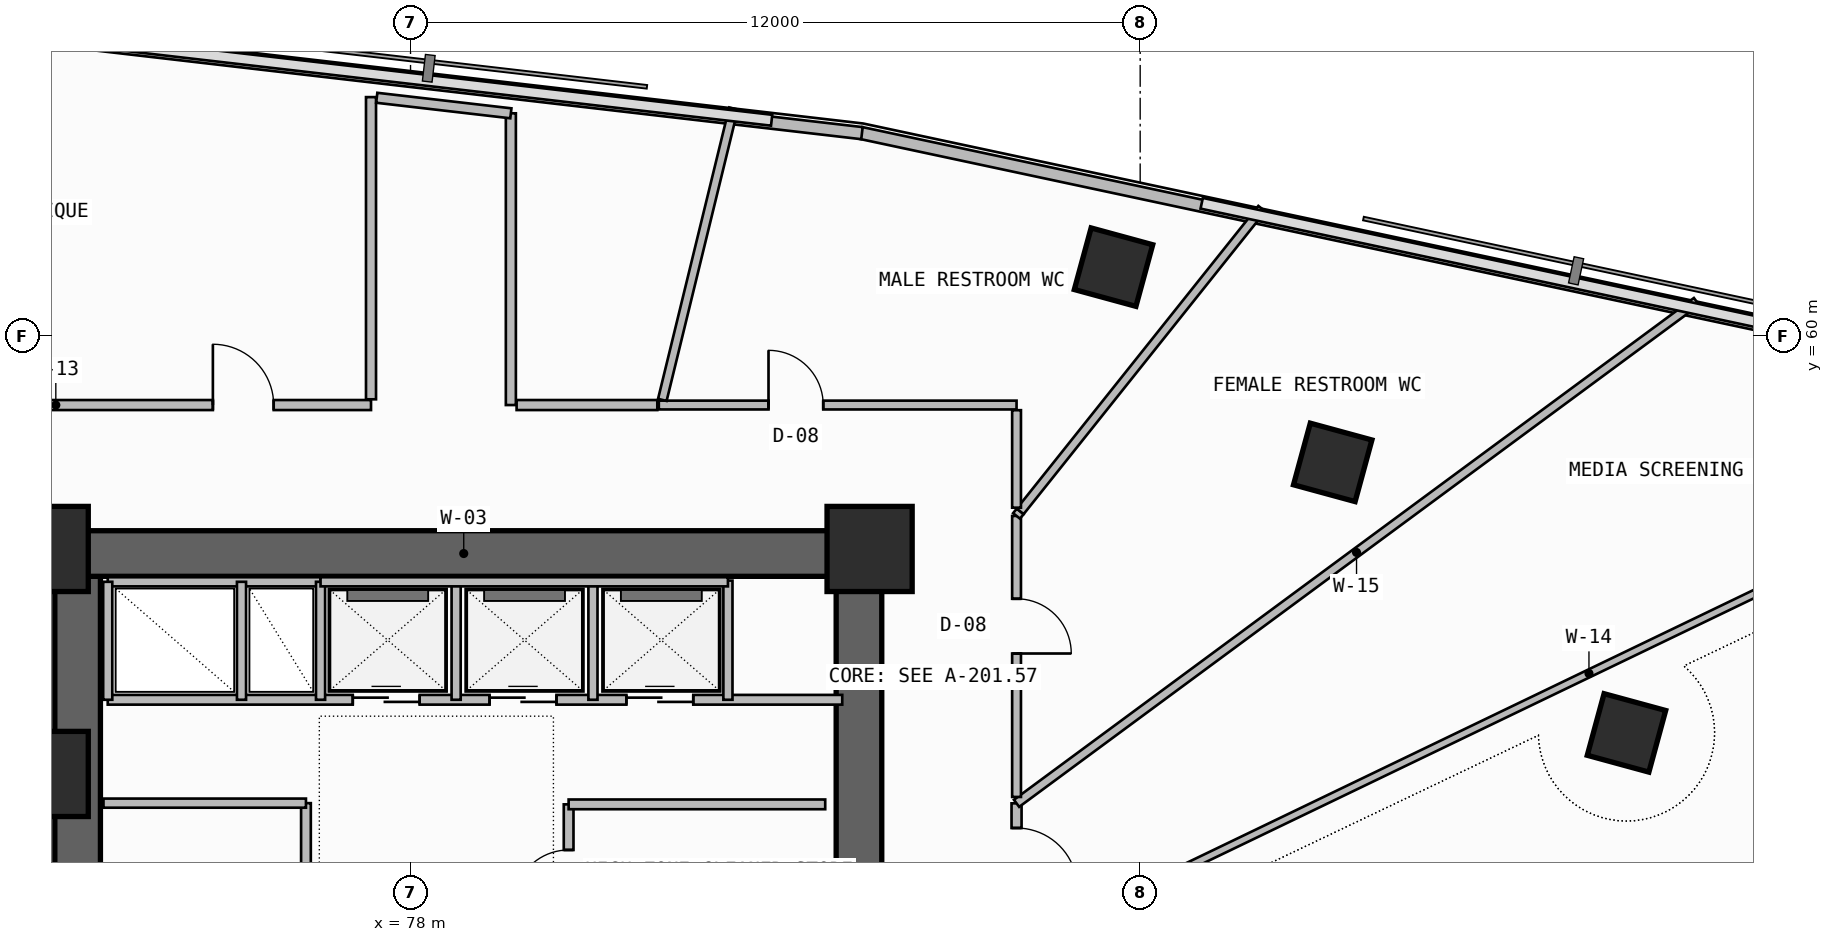
"""IFC4 building model, lengths in metres.
Left out: names, types, materials, properties, quantities, classifications, styles, units other than length and angle.
Written with IfcOpenShell. Run it as: python <this file> out.ifc"""

import sys

from ifc_helpers import new_model, si_unit, direction, frame, frame_2d, origin, origin_2d, place, context, subcontext, project, spatial, rectangle, extrude, element, fill, save


model = new_model("IFC4")
c1 = context("Model", 3, precision=1e-05, world=origin(), true_north=direction((0.0, 1.0)))
c2 = subcontext(c1, "Body", "Model", "MODEL_VIEW")
j1 = project(units=[si_unit("LENGTHUNIT", "METRE"), si_unit("PLANEANGLEUNIT", "RADIAN")], contexts=[c1])
p1 = place(None, origin())
s1 = spatial("IfcSite", under=j1, at=p1, CompositionType="ELEMENT")
p2 = place(p1, origin())
s2 = spatial("IfcBuilding", under=s1, at=p2, CompositionType="ELEMENT")
p3 = place(p2, frame((0.0, 0.0, 204.42)))
s3 = spatial("IfcBuildingStorey", under=s2, at=p3, CompositionType="ELEMENT", Elevation=204.42)
p4 = place(p3, frame((72.525, 43.35, -0.26), z_axis=(0.0, 0.0, 1.0), x_axis=(0.0, 1.0, 0.0)))
e1 = element("IfcWall", 1, at=p4, inside=s3, PredefinedType="SHEAR", context=c2, shape_type="SweptSolid", body=[
    extrude(rectangle(XDim=12.7, YDim=0.75, at=frame_2d((6.35, 0.0))), origin(), (0.0, 0.0, 1.0), 3.52),
])
p5 = place(p4, frame((1.35, 0.0, 0.26)))
e2 = element("IfcOpeningElement", 2, at=p5, cuts=e1, PredefinedType="OPENING", context=c2, shape_type="SweptSolid", body=[
    extrude(rectangle(XDim=1.2, YDim=2.2, at=frame_2d((0.6, 1.1))), frame((0.0, 0.385, 0.0), z_axis=(0.0, -1.0, 0.0), x_axis=(1.0, 0.0, 0.0)), (0.0, 0.0, 1.0), 0.77),
])
p6 = place(p3, frame((72.0, 56.425, -0.26), z_axis=(0.0, 0.0, 1.0), x_axis=(1.0, 0.0, 0.0)))
e3 = element("IfcWall", 3, at=p6, inside=s3, PredefinedType="SHEAR", context=c2, shape_type="SweptSolid", body=[
    extrude(rectangle(XDim=13.75, YDim=0.75, at=frame_2d((6.875, 0.0))), origin(), (0.0, 0.0, 1.0), 3.52),
])
p7 = place(p3, frame((85.375, 47.6, -0.26), z_axis=(0.0, 0.0, 1.0), x_axis=(0.0, 1.0, 0.0)))
e4 = element("IfcWall", 4, at=p7, inside=s3, PredefinedType="SHEAR", context=c2, shape_type="SweptSolid", body=[
    extrude(rectangle(XDim=8.45, YDim=0.75, at=frame_2d((4.225, 0.0))), origin(), (0.0, 0.0, 1.0), 3.52),
])
for number, where, z_axis, x_axis in (
    (5, (72.0, 52.8, 0.0), (0.0, 0.0, 1.0), (1.0, 0.0, 0.0)),
    (6, (72.0, 56.5, 0.0), (0.0, 0.0, 1.0), (1.0, 0.0, 0.0)),
    (7, (85.55, 56.5, 0.0), (0.0, 0.0, 1.0), (1.0, 0.0, 0.0)),
):
    element("IfcColumn", number, at=place(p3, frame(where, z_axis=z_axis, x_axis=x_axis)), inside=s3, PredefinedType="COLUMN", context=c2, shape_type="SweptSolid", body=[
        extrude(rectangle(XDim=1.4, YDim=1.4, at=origin_2d()), origin(), (0.0, 0.0, 1.0), 3.52),
    ])
for number, where, z_axis, x_axis in (
    (8, (97.998, 53.475, 0.0), (0.0, 0.0, 1.0), (0.263, 0.965, 0.0)),
    (9, (93.167, 57.924, 0.0), (0.0, 0.0, 1.0), (0.263, 0.965, 0.0)),
    (10, (89.562, 61.135, 0.0), (0.0, 0.0, 1.0), (0.263, 0.965, 0.0)),
):
    element("IfcColumn", number, at=place(p3, frame(where, z_axis=z_axis, x_axis=x_axis)), inside=s3, PredefinedType="COLUMN", context=c2, shape_type="SweptSolid", body=[
        extrude(rectangle(XDim=1.05, YDim=1.05, at=origin_2d()), origin(), (0.0, 0.0, 1.0), 3.52),
    ])
p8 = place(p3, frame((116.396, 56.722, 0.0), z_axis=(0.0, 0.0, 1.0), x_axis=(-0.977936620644, 0.208901809478, 0.0)))
e11 = element("IfcWall", 11, at=p8, inside=s3, PredefinedType="PARAPET", context=c2, shape_type="SweptSolid", body=[
    extrude(rectangle(XDim=31.685, YDim=0.2, at=frame_2d((15.843, 0.0))), origin(), (0.0, 0.0, 1.0), 1.15),
])
p9 = place(p3, frame((85.424, 63.338, 0.0), z_axis=(0.0, 0.0, 1.0), x_axis=(-0.993364714048, 0.115006716693, 0.0)))
e12 = element("IfcWall", 12, at=p9, inside=s3, PredefinedType="PARAPET", context=c2, shape_type="SweptSolid", body=[
    extrude(rectangle(XDim=26.302, YDim=0.2, at=frame_2d((13.151, 0.0))), origin(), (0.0, 0.0, 1.0), 1.15),
])
p10 = place(p3, frame((76.28, 47.18, 0.0), z_axis=(0.0, 0.0, 1.0), x_axis=(0.0, 1.0, 0.0)))
e13 = element("IfcWall", 13, at=p10, inside=s3, PredefinedType="SOLIDWALL", context=c2, shape_type="SweptSolid", body=[
    extrude(rectangle(XDim=5.14, YDim=0.16, at=frame_2d((2.57, 0.0))), origin(), (0.0, 0.0, 1.0), 3.26),
])
p11 = place(p10, frame((0.75, 0.0, 0.0)))
e14 = element("IfcOpeningElement", 14, at=p11, cuts=e13, PredefinedType="OPENING", context=c2, shape_type="SweptSolid", body=[
    extrude(rectangle(XDim=1.0, YDim=2.2, at=frame_2d((0.5, 1.1))), frame((0.0, 0.09, 0.0), z_axis=(0.0, -1.0, 0.0), x_axis=(1.0, 0.0, 0.0)), (0.0, 0.0, 1.0), 0.18),
])
p12 = place(p10, frame((3.2, 0.0, 0.0)))
e15 = element("IfcOpeningElement", 15, at=p12, cuts=e13, PredefinedType="OPENING", context=c2, shape_type="SweptSolid", body=[
    extrude(rectangle(XDim=0.9, YDim=2.1, at=frame_2d((0.45, 1.05))), frame((0.0, 0.09, 0.0), z_axis=(0.0, -1.0, 0.0), x_axis=(1.0, 0.0, 0.0)), (0.0, 0.0, 1.0), 0.18),
])
p13 = place(p3, frame((72.95, 52.32, 0.0), z_axis=(0.0, 0.0, 1.0), x_axis=(1.0, 0.0, 0.0)))
e16 = element("IfcWall", 16, at=p13, inside=s3, PredefinedType="SOLIDWALL", context=c2, shape_type="SweptSolid", body=[
    extrude(rectangle(XDim=3.33, YDim=0.15, at=frame_2d((1.665, 0.0))), origin(), (0.0, 0.0, 1.0), 3.26),
])
p14 = place(p3, frame((80.6, 47.7, 0.0), z_axis=(0.0, 0.0, 1.0), x_axis=(0.0, 1.0, 0.0)))
e17 = element("IfcWall", 17, at=p14, inside=s3, PredefinedType="SOLIDWALL", context=c2, shape_type="SweptSolid", body=[
    extrude(rectangle(XDim=4.6, YDim=0.16, at=frame_2d((2.3, 0.0))), origin(), (0.0, 0.0, 1.0), 3.26),
])
p15 = place(p14, frame((0.75, 0.0, 0.0)))
e18 = element("IfcOpeningElement", 18, at=p15, cuts=e17, PredefinedType="OPENING", context=c2, shape_type="SweptSolid", body=[
    extrude(rectangle(XDim=1.0, YDim=2.2, at=frame_2d((0.5, 1.1))), frame((0.0, 0.09, 0.0), z_axis=(0.0, -1.0, 0.0), x_axis=(1.0, 0.0, 0.0)), (0.0, 0.0, 1.0), 0.18),
])
p16 = place(p14, frame((2.95, 0.0, 0.0)))
e19 = element("IfcOpeningElement", 19, at=p16, cuts=e17, PredefinedType="OPENING", context=c2, shape_type="SweptSolid", body=[
    extrude(rectangle(XDim=0.9, YDim=2.1, at=frame_2d((0.45, 1.05))), frame((0.0, 0.09, 0.0), z_axis=(0.0, -1.0, 0.0), x_axis=(1.0, 0.0, 0.0)), (0.0, 0.0, 1.0), 0.18),
])
p17 = place(p3, frame((80.6, 52.3, 0.0), z_axis=(0.0, 0.0, 1.0), x_axis=(1.0, 0.0, 0.0)))
e20 = element("IfcWall", 20, at=p17, inside=s3, PredefinedType="SOLIDWALL", context=c2, shape_type="SweptSolid", body=[
    extrude(rectangle(XDim=4.22, YDim=0.16, at=frame_2d((2.11, 0.0))), origin(), (0.0, 0.0, 1.0), 3.26),
])
p18 = place(p3, frame((73.02, 54.02, 0.0), z_axis=(0.0, 0.0, 1.0), x_axis=(1.0, 0.0, 0.0)))
e21 = element("IfcWall", 21, at=p18, inside=s3, PredefinedType="SOLIDWALL", context=c2, shape_type="SweptSolid", body=[
    extrude(rectangle(XDim=12.08, YDim=0.16, at=frame_2d((6.04, 0.0))), origin(), (0.0, 0.0, 1.0), 3.26),
])
p19 = place(p18, frame((4.03, 0.0, 0.0)))
e22 = element("IfcOpeningElement", 22, at=p19, cuts=e21, PredefinedType="OPENING", context=c2, shape_type="SweptSolid", body=[
    extrude(rectangle(XDim=1.1, YDim=2.25, at=frame_2d((0.55, 1.125))), frame((0.0, 0.09, 0.0), z_axis=(0.0, -1.0, 0.0), x_axis=(1.0, 0.0, 0.0)), (0.0, 0.0, 1.0), 0.18),
])
p20 = place(p18, frame((6.28, 0.0, 0.0)))
e23 = element("IfcOpeningElement", 23, at=p20, cuts=e21, PredefinedType="OPENING", context=c2, shape_type="SweptSolid", body=[
    extrude(rectangle(XDim=1.1, YDim=2.25, at=frame_2d((0.55, 1.125))), frame((0.0, 0.09, 0.0), z_axis=(0.0, -1.0, 0.0), x_axis=(1.0, 0.0, 0.0)), (0.0, 0.0, 1.0), 0.18),
])
p21 = place(p18, frame((8.53, 0.0, 0.0)))
e24 = element("IfcOpeningElement", 24, at=p21, cuts=e21, PredefinedType="OPENING", context=c2, shape_type="SweptSolid", body=[
    extrude(rectangle(XDim=1.1, YDim=2.25, at=frame_2d((0.55, 1.125))), frame((0.0, 0.09, 0.0), z_axis=(0.0, -1.0, 0.0), x_axis=(1.0, 0.0, 0.0)), (0.0, 0.0, 1.0), 0.18),
])
p22 = place(p3, frame((73.02, 55.96, 0.0), z_axis=(0.0, 0.0, 1.0), x_axis=(1.0, 0.0, 0.0)))
e25 = element("IfcWall", 25, at=p22, inside=s3, PredefinedType="SOLIDWALL", context=c2, shape_type="SweptSolid", body=[
    extrude(rectangle(XDim=3.5, YDim=0.15, at=frame_2d((1.75, 0.0))), origin(), (0.0, 0.0, 1.0), 3.26),
])
p23 = place(p3, frame((73.02, 54.02, 0.0), z_axis=(0.0, 0.0, 1.0), x_axis=(0.0, 1.0, 0.0)))
e26 = element("IfcWall", 26, at=p23, inside=s3, PredefinedType="PLUMBINGWALL", context=c2, shape_type="SweptSolid", body=[
    extrude(rectangle(XDim=1.94, YDim=0.15, at=frame_2d((0.97, 0.0))), origin(), (0.0, 0.0, 1.0), 3.26),
])
p24 = place(p3, frame((76.52, 54.02, 0.0), z_axis=(0.0, 0.0, 1.0), x_axis=(0.0, 1.0, 0.0)))
e27 = element("IfcWall", 27, at=p24, inside=s3, PredefinedType="SOLIDWALL", context=c2, shape_type="SweptSolid", body=[
    extrude(rectangle(XDim=1.94, YDim=0.15, at=frame_2d((0.97, 0.0))), origin(), (0.0, 0.0, 1.0), 3.26),
])
p25 = place(p3, frame((75.22, 54.02, 0.0), z_axis=(0.0, 0.0, 1.0), x_axis=(0.0, 1.0, 0.0)))
e28 = element("IfcWall", 28, at=p25, inside=s3, PredefinedType="PLUMBINGWALL", context=c2, shape_type="SweptSolid", body=[
    extrude(rectangle(XDim=1.94, YDim=0.15, at=frame_2d((0.97, 0.0))), origin(), (0.0, 0.0, 1.0), 3.26),
])
for number, where, z_axis, x_axis in (
    (29, (78.75, 54.02, 0.0), (0.0, 0.0, 1.0), (0.0, 1.0, 0.0)),
    (30, (81.0, 54.02, 0.0), (0.0, 0.0, 1.0), (0.0, 1.0, 0.0)),
):
    element("IfcWall", number, at=place(p3, frame(where, z_axis=z_axis, x_axis=x_axis)), inside=s3, PredefinedType="PLUMBINGWALL", context=c2, shape_type="SweptSolid", body=[
        extrude(rectangle(XDim=1.96, YDim=0.15, at=frame_2d((0.98, 0.0))), origin(), (0.0, 0.0, 1.0), 3.26),
    ])
p26 = place(p3, frame((83.22, 54.02, 0.0), z_axis=(0.0, 0.0, 1.0), x_axis=(0.0, 1.0, 0.0)))
e31 = element("IfcWall", 31, at=p26, inside=s3, PredefinedType="SOLIDWALL", context=c2, shape_type="SweptSolid", body=[
    extrude(rectangle(XDim=1.96, YDim=0.15, at=frame_2d((0.98, 0.0))), origin(), (0.0, 0.0, 1.0), 3.26),
])
p27 = place(p3, frame((76.52, 55.96, 0.0), z_axis=(0.0, 0.0, 1.0), x_axis=(1.0, 0.0, 0.0)))
e32 = element("IfcWall", 32, at=p27, inside=s3, PredefinedType="SOLIDWALL", context=c2, shape_type="SweptSolid", body=[
    extrude(rectangle(XDim=6.7, YDim=0.15, at=frame_2d((3.35, 0.0))), origin(), (0.0, 0.0, 1.0), 3.26),
])
p28 = place(p3, frame((88.036, 49.955, 0.0), z_axis=(0.0, 0.0, 1.0), x_axis=(0.90105618902, 0.433702368253, 0.0)))
e33 = element("IfcWall", 33, at=p28, inside=s3, PredefinedType="PARTITIONING", context=c2, shape_type="SweptSolid", body=[
    extrude(rectangle(XDim=20.742, YDim=0.125, at=frame_2d((10.371, 0.0))), origin(), (0.0, 0.0, 1.0), 2.645),
])
p29 = place(p3, frame((87.967, 49.982, 0.0), z_axis=(0.0, 0.0, 1.0), x_axis=(0.0, 1.0, 0.0)))
e34 = element("IfcWall", 34, at=p29, inside=s3, PredefinedType="PARTITIONING", context=c2, shape_type="SweptSolid", body=[
    extrude(rectangle(XDim=2.335, YDim=0.165, at=frame_2d((1.167, 0.0))), origin(), (0.0, 0.0, 1.0), 3.26),
])
p30 = place(p29, frame((0.929, 0.0, 0.0)))
e35 = element("IfcOpeningElement", 35, at=p30, cuts=e34, PredefinedType="OPENING", context=c2, shape_type="SweptSolid", body=[
    extrude(rectangle(XDim=1.0, YDim=2.2, at=frame_2d((0.5, 1.1))), frame((0.0, 0.093, 0.0), z_axis=(0.0, -1.0, 0.0), x_axis=(1.0, 0.0, 0.0)), (0.0, 0.0, 1.0), 0.185),
])
p31 = place(p3, frame((87.967, 52.317, 0.0), z_axis=(0.0, 0.0, 1.0), x_axis=(0.804642818132, 0.593759155911, 0.0)))
e36 = element("IfcWall", 36, at=p31, inside=s3, PredefinedType="PARTITIONING", context=c2, shape_type="SweptSolid", body=[
    extrude(rectangle(XDim=13.898, YDim=0.145, at=frame_2d((6.949, 0.0))), origin(), (0.0, 0.0, 1.0), 2.645),
])
p32 = place(p3, frame((87.967, 52.422, 0.0), z_axis=(0.0, 0.0, 1.0), x_axis=(0.0, 1.0, 0.0)))
e37 = element("IfcWall", 37, at=p32, inside=s3, PredefinedType="PARTITIONING", context=c2, shape_type="SweptSolid", body=[
    extrude(rectangle(XDim=4.621, YDim=0.145, at=frame_2d((2.311, 0.0))), origin(), (0.0, 0.0, 1.0), 2.745),
])
p33 = place(p32, frame((2.359, 0.0, 0.0)))
e38 = element("IfcOpeningElement", 38, at=p33, cuts=e37, PredefinedType="OPENING", context=c2, shape_type="SweptSolid", body=[
    extrude(rectangle(XDim=0.9, YDim=2.1, at=frame_2d((0.45, 1.05))), frame((0.0, 0.083, 0.0), z_axis=(0.0, -1.0, 0.0), x_axis=(1.0, 0.0, 0.0)), (0.0, 0.0, 1.0), 0.165),
])
p34 = place(p3, frame((87.967, 57.043, 0.0), z_axis=(0.0, 0.0, 1.0), x_axis=(0.62407609663, 0.781363568139, 0.0)))
e39 = element("IfcWall", 39, at=p34, inside=s3, PredefinedType="PARTITIONING", context=c2, shape_type="SweptSolid", body=[
    extrude(rectangle(XDim=0.096, YDim=0.145, at=frame_2d((0.048, 0.0))), origin(), (0.0, 0.0, 1.0), 2.745),
])
p35 = place(p3, frame((88.027, 57.118, 0.0), z_axis=(0.0, 0.0, 1.0), x_axis=(0.623829889611, 0.781560150486, 0.0)))
e40 = element("IfcWall", 40, at=p35, inside=s3, PredefinedType="PARTITIONING", context=c2, shape_type="SweptSolid", body=[
    extrude(rectangle(XDim=6.369, YDim=0.145, at=frame_2d((3.185, 0.0))), origin(), (0.0, 0.0, 1.0), 2.645),
])
p36 = place(p3, frame((87.967, 58.867, 0.0), z_axis=(0.0, 0.0, 1.0), x_axis=(-1.0, 0.0, 0.0)))
e41 = element("IfcWall", 41, at=p36, inside=s3, PredefinedType="PARTITIONING", context=c2, shape_type="SweptSolid", body=[
    extrude(rectangle(XDim=5.884, YDim=0.145, at=frame_2d((2.942, 0.0))), origin(), (0.0, 0.0, 1.0), 2.745),
])
p37 = place(p36, frame((3.179, 0.0, 0.0)))
e42 = element("IfcOpeningElement", 42, at=p37, cuts=e41, PredefinedType="OPENING", context=c2, shape_type="SweptSolid", body=[
    extrude(rectangle(XDim=0.9, YDim=2.1, at=frame_2d((0.45, 1.05))), frame((0.0, 0.083, 0.0), z_axis=(0.0, -1.0, 0.0), x_axis=(1.0, 0.0, 0.0)), (0.0, 0.0, 1.0), 0.165),
])
p38 = place(p3, frame((87.967, 57.179, 0.0), z_axis=(0.0, 0.0, 1.0), x_axis=(0.0, 1.0, 0.0)))
e43 = element("IfcWall", 43, at=p38, inside=s3, PredefinedType="PARTITIONING", context=c2, shape_type="SweptSolid", body=[
    extrude(rectangle(XDim=1.604, YDim=0.145, at=frame_2d((0.802, 0.0))), origin(), (0.0, 0.0, 1.0), 2.745),
])
p39 = place(p3, frame((82.141, 58.951, 0.0), z_axis=(0.0, 0.0, 1.0), x_axis=(0.237338941626, 0.971426902442, 0.0)))
e44 = element("IfcWall", 44, at=p39, inside=s3, PredefinedType="PARTITIONING", context=c2, shape_type="SweptSolid", body=[
    extrude(rectangle(XDim=4.933, YDim=0.145, at=frame_2d((2.467, 0.0))), origin(), (0.0, 0.0, 1.0), 3.26),
])
p40 = place(p3, frame((77.35, 58.867, 0.0), z_axis=(0.0, 0.0, 1.0), x_axis=(-1.0, 0.0, 0.0)))
e45 = element("IfcWall", 45, at=p40, inside=s3, PredefinedType="PARTITIONING", context=c2, shape_type="SweptSolid", body=[
    extrude(rectangle(XDim=7.767, YDim=0.165, at=frame_2d((3.883, 0.0))), origin(), (0.0, 0.0, 1.0), 3.26),
])
p41 = place(p40, frame((1.601, 0.0, 0.0)))
e46 = element("IfcOpeningElement", 46, at=p41, cuts=e45, PredefinedType="OPENING", context=c2, shape_type="SweptSolid", body=[
    extrude(rectangle(XDim=1.0, YDim=2.2, at=frame_2d((0.5, 1.1))), frame((0.0, 0.093, 0.0), z_axis=(0.0, -1.0, 0.0), x_axis=(1.0, 0.0, 0.0)), (0.0, 0.0, 1.0), 0.185),
])
p42 = place(p3, frame((77.35, 63.931, 0.0), z_axis=(0.0, 0.0, 1.0), x_axis=(0.0, -1.0, 0.0)))
e47 = element("IfcWall", 47, at=p42, inside=s3, PredefinedType="PARTITIONING", context=c2, shape_type="SweptSolid", body=[
    extrude(rectangle(XDim=4.97, YDim=0.165, at=frame_2d((2.485, 0.0))), origin(), (0.0, 0.0, 1.0), 3.26),
])
p43 = place(p3, frame((79.65, 58.867, 0.0), z_axis=(0.0, 0.0, 1.0), x_axis=(0.0, 1.0, 0.0)))
e48 = element("IfcWall", 48, at=p43, inside=s3, PredefinedType="PARTITIONING", context=c2, shape_type="SweptSolid", body=[
    extrude(rectangle(XDim=4.798, YDim=0.165, at=frame_2d((2.399, 0.0))), origin(), (0.0, 0.0, 1.0), 3.26),
])
p44 = place(p3, frame((82.059, 58.867, 0.0), z_axis=(0.0, 0.0, 1.0), x_axis=(-1.0, 0.0, 0.0)))
e49 = element("IfcWall", 49, at=p44, inside=s3, PredefinedType="PARTITIONING", context=c2, shape_type="SweptSolid", body=[
    extrude(rectangle(XDim=2.314, YDim=0.165, at=frame_2d((1.157, 0.0))), origin(), (0.0, 0.0, 1.0), 3.26),
])
p45 = place(p3, frame((79.65, 63.665, 0.0), z_axis=(0.0, 0.0, 1.0), x_axis=(-0.993362136032, 0.115028981987, 0.0)))
e50 = element("IfcWall", 50, at=p45, inside=s3, PredefinedType="PARTITIONING", context=c2, shape_type="SweptSolid", body=[
    extrude(rectangle(XDim=2.22, YDim=0.165, at=frame_2d((1.11, 0.0))), origin(), (0.0, 0.0, 1.0), 3.26),
])
p46 = place(p16, origin())
e51 = element("IfcDoor", 51, at=p46, inside=s3, OperationType="SINGLE_SWING_LEFT", PredefinedType="DOOR", context=c2, shape_type="SweptSolid", body=[
    extrude(rectangle(XDim=0.9, YDim=2.1, at=frame_2d((0.45, 1.05))), frame((0.0, 0.025, 0.0), z_axis=(0.0, -1.0, 0.0), x_axis=(1.0, 0.0, 0.0)), (0.0, 0.0, 1.0), 0.05),
])
fill(e19, e51)
p47 = place(p19, origin())
e52 = element("IfcDoor", 52, at=p47, inside=s3, OperationType="DOUBLE_DOOR_SLIDING", PredefinedType="DOOR", context=c2, shape_type="SweptSolid", body=[
    extrude(rectangle(XDim=1.1, YDim=2.25, at=frame_2d((0.55, 1.125))), frame((0.0, 0.025, 0.0), z_axis=(0.0, -1.0, 0.0), x_axis=(1.0, 0.0, 0.0)), (0.0, 0.0, 1.0), 0.05),
])
fill(e22, e52)
p48 = place(p20, origin())
e53 = element("IfcDoor", 53, at=p48, inside=s3, OperationType="DOUBLE_DOOR_SLIDING", PredefinedType="DOOR", context=c2, shape_type="SweptSolid", body=[
    extrude(rectangle(XDim=1.1, YDim=2.25, at=frame_2d((0.55, 1.125))), frame((0.0, 0.025, 0.0), z_axis=(0.0, -1.0, 0.0), x_axis=(1.0, 0.0, 0.0)), (0.0, 0.0, 1.0), 0.05),
])
fill(e23, e53)
p49 = place(p21, origin())
e54 = element("IfcDoor", 54, at=p49, inside=s3, OperationType="DOUBLE_DOOR_SLIDING", PredefinedType="DOOR", context=c2, shape_type="SweptSolid", body=[
    extrude(rectangle(XDim=1.1, YDim=2.25, at=frame_2d((0.55, 1.125))), frame((0.0, 0.025, 0.0), z_axis=(0.0, -1.0, 0.0), x_axis=(1.0, 0.0, 0.0)), (0.0, 0.0, 1.0), 0.05),
])
fill(e24, e54)
p50 = place(p30, frame((1.0, 0.0, 0.0), z_axis=(0.0, 0.0, 1.0), x_axis=(-1.0, 0.0, 0.0)))
e55 = element("IfcDoor", 55, at=p50, inside=s3, OperationType="SINGLE_SWING_RIGHT", PredefinedType="DOOR", context=c2, shape_type="SweptSolid", body=[
    extrude(rectangle(XDim=1.0, YDim=2.2, at=frame_2d((0.5, 1.1))), frame((0.0, 0.025, 0.0), z_axis=(0.0, -1.0, 0.0), x_axis=(1.0, 0.0, 0.0)), (0.0, 0.0, 1.0), 0.05),
])
fill(e35, e55)
p51 = place(p33, frame((0.9, 0.0, 0.0), z_axis=(0.0, 0.0, 1.0), x_axis=(-1.0, 0.0, 0.0)))
e56 = element("IfcDoor", 56, at=p51, inside=s3, OperationType="SINGLE_SWING_RIGHT", PredefinedType="DOOR", context=c2, shape_type="SweptSolid", body=[
    extrude(rectangle(XDim=0.9, YDim=2.1, at=frame_2d((0.45, 1.05))), frame((0.0, 0.025, 0.0), z_axis=(0.0, -1.0, 0.0), x_axis=(1.0, 0.0, 0.0)), (0.0, 0.0, 1.0), 0.05),
])
fill(e38, e56)
p52 = place(p37, frame((0.9, 0.0, 0.0), z_axis=(0.0, 0.0, 1.0), x_axis=(-1.0, 0.0, 0.0)))
e57 = element("IfcDoor", 57, at=p52, inside=s3, OperationType="SINGLE_SWING_LEFT", PredefinedType="DOOR", context=c2, shape_type="SweptSolid", body=[
    extrude(rectangle(XDim=0.9, YDim=2.1, at=frame_2d((0.45, 1.05))), frame((0.0, 0.025, 0.0), z_axis=(0.0, -1.0, 0.0), x_axis=(1.0, 0.0, 0.0)), (0.0, 0.0, 1.0), 0.05),
])
fill(e42, e57)
p53 = place(p41, frame((1.0, 0.0, 0.0), z_axis=(0.0, 0.0, 1.0), x_axis=(-1.0, 0.0, 0.0)))
e58 = element("IfcDoor", 58, at=p53, inside=s3, OperationType="SINGLE_SWING_LEFT", PredefinedType="DOOR", context=c2, shape_type="SweptSolid", body=[
    extrude(rectangle(XDim=1.0, YDim=2.2, at=frame_2d((0.5, 1.1))), frame((0.0, 0.025, 0.0), z_axis=(0.0, -1.0, 0.0), x_axis=(1.0, 0.0, 0.0)), (0.0, 0.0, 1.0), 0.05),
])
fill(e46, e58)
save(model, sys.argv[1])
